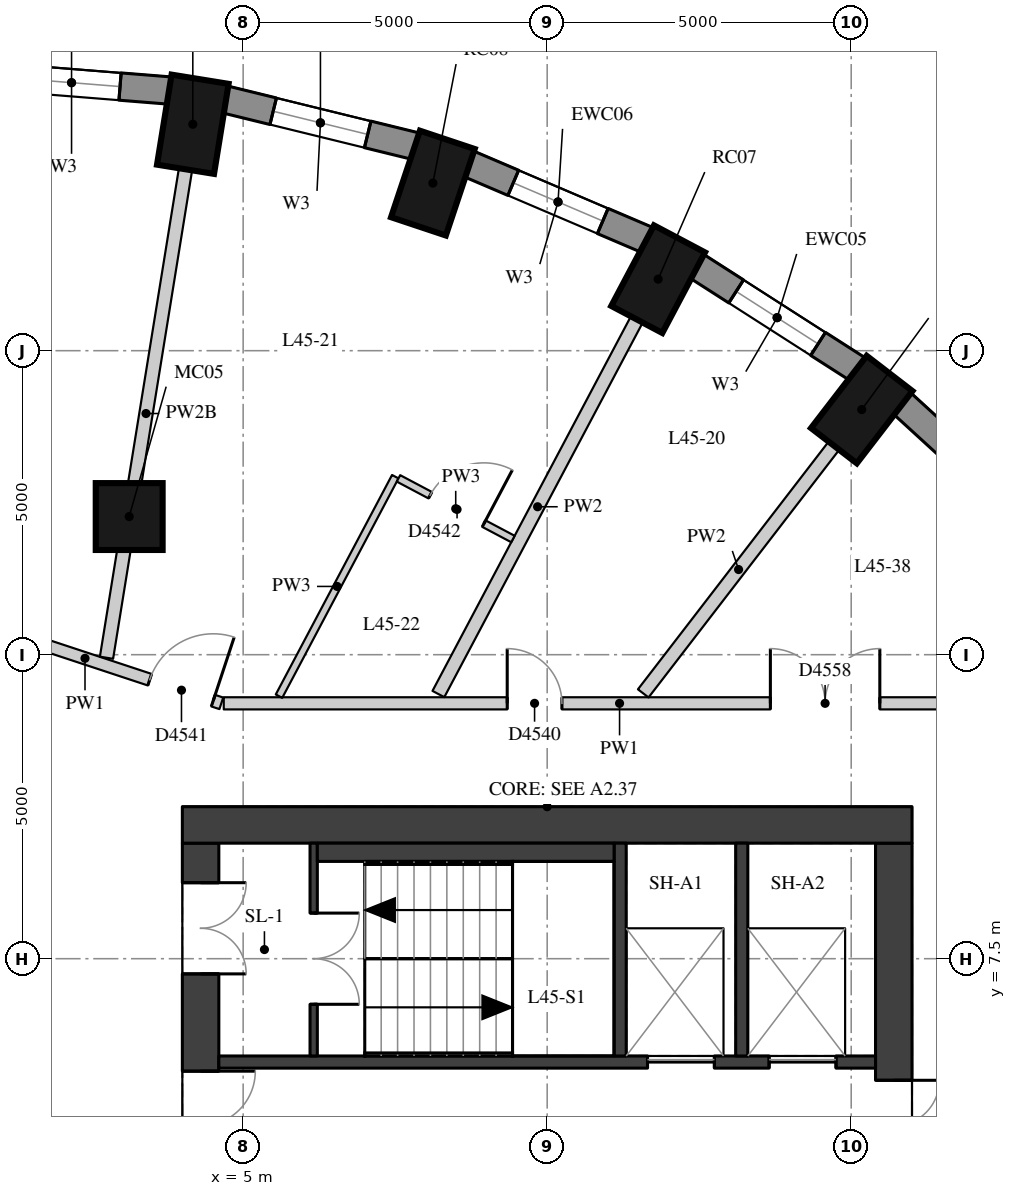
"""IFC4 building model, lengths in metres.
Left out: names, types, materials, properties, quantities, classifications, styles, units other than length and angle.
Written with IfcOpenShell. Run it as: python <this file> out.ifc"""

import sys

from ifc_helpers import new_model, si_unit, direction, frame, frame_2d, origin, origin_2d, place, context, subcontext, project, spatial, rectangle, extrude, element, fill, save


model = new_model("IFC4")
c1 = context("Model", 3, precision=1e-05, world=origin(), true_north=direction((0.0, 1.0)))
c2 = subcontext(c1, "Body", "Model", "MODEL_VIEW")
j1 = project(units=[si_unit("LENGTHUNIT", "METRE"), si_unit("PLANEANGLEUNIT", "RADIAN")], contexts=[c1])
p1 = place(None, origin())
s1 = spatial("IfcSite", under=j1, at=p1, CompositionType="ELEMENT")
p2 = place(p1, origin())
s2 = spatial("IfcBuilding", under=s1, at=p2, CompositionType="ELEMENT")
p3 = place(p2, frame((0.0, 0.0, 161.6)))
s3 = spatial("IfcBuildingStorey", under=s2, at=p3, CompositionType="ELEMENT", Elevation=161.6)
for number, where, z_axis, x_axis in (
    (1, (15.173, 16.532, 0.0), (0.0, 0.0, 1.0), (0.61, 0.792, 0.0)),
    (2, (11.825, 18.676, 0.0), (0.0, 0.0, 1.0), (0.468, 0.884, 0.0)),
    (3, (8.12, 20.256, 0.0), (0.0, 0.0, 1.0), (0.317, 0.949, 0.0)),
    (4, (4.172, 21.224, 0.0), (0.0, 0.0, 1.0), (0.16, 0.987, 0.0)),
):
    element("IfcColumn", number, at=place(p3, frame(where, z_axis=z_axis, x_axis=x_axis)), inside=s3, PredefinedType="COLUMN", context=c2, shape_type="SweptSolid", body=[
        extrude(rectangle(XDim=1.5, YDim=0.95, at=origin_2d()), origin(), (0.0, 0.0, 1.0), 3.3),
    ])
p4 = place(p3, frame((3.126, 14.772, 0.0), z_axis=(0.0, 0.0, 1.0), x_axis=(1.0, 0.0, 0.0)))
e5 = element("IfcColumn", 5, at=p4, inside=s3, PredefinedType="COLUMN", context=c2, shape_type="SweptSolid", body=[
    extrude(rectangle(XDim=1.1, YDim=1.1, at=origin_2d()), origin(), (0.0, 0.0, 1.0), 3.3),
])
p5 = place(p3, frame((18.113, 14.55, 0.0), z_axis=(0.0, 0.0, 1.0), x_axis=(-0.737808755941, 0.675009807082, 0.0)))
e6 = element("IfcWall", 6, at=p5, inside=s3, PredefinedType="SOLIDWALL", context=c2, shape_type="SweptSolid", body=[
    extrude(rectangle(XDim=3.094, YDim=0.45, at=frame_2d((1.547, 0.0))), origin(), (0.0, 0.0, 1.0), 3.02),
])
p6 = place(p3, frame((15.108, 17.193, 0.0), z_axis=(0.0, 0.0, 1.0), x_axis=(-0.842030726237, 0.539429565442, 0.0)))
e7 = element("IfcWall", 7, at=p6, inside=s3, PredefinedType="SOLIDWALL", context=c2, shape_type="SweptSolid", body=[
    extrude(rectangle(XDim=3.151, YDim=0.45, at=frame_2d((1.576, 0.0))), origin(), (0.0, 0.0, 1.0), 3.02),
])
p7 = place(p6, frame((0.776, 0.0, 0.4)))
e8 = element("IfcOpeningElement", 8, at=p7, cuts=e7, PredefinedType="OPENING", context=c2, shape_type="SweptSolid", body=[
    extrude(rectangle(XDim=1.6, YDim=1.75, at=frame_2d((0.8, 0.875))), frame((0.0, 0.235, 0.0), z_axis=(0.0, -1.0, 0.0), x_axis=(1.0, 0.0, 0.0)), (0.0, 0.0, 1.0), 0.47),
])
p8 = place(p3, frame((11.65, 19.319, 0.0), z_axis=(0.0, 0.0, 1.0), x_axis=(-0.91981046949, 0.392362969986, 0.0)))
e9 = element("IfcWall", 9, at=p8, inside=s3, PredefinedType="SOLIDWALL", context=c2, shape_type="SweptSolid", body=[
    extrude(rectangle(XDim=3.201, YDim=0.45, at=frame_2d((1.6, 0.0))), origin(), (0.0, 0.0, 1.0), 3.02),
])
p9 = place(p8, frame((0.8, 0.0, 0.4)))
e10 = element("IfcOpeningElement", 10, at=p9, cuts=e9, PredefinedType="OPENING", context=c2, shape_type="SweptSolid", body=[
    extrude(rectangle(XDim=1.6, YDim=1.75, at=frame_2d((0.8, 0.875))), frame((0.0, 0.235, 0.0), z_axis=(0.0, -1.0, 0.0), x_axis=(1.0, 0.0, 0.0)), (0.0, 0.0, 1.0), 0.47),
])
p10 = place(p3, frame((7.843, 20.862, 0.0), z_axis=(0.0, 0.0, 1.0), x_axis=(-0.971237178372, 0.238114139328, 0.0)))
e11 = element("IfcWall", 11, at=p10, inside=s3, PredefinedType="SOLIDWALL", context=c2, shape_type="SweptSolid", body=[
    extrude(rectangle(XDim=3.237, YDim=0.45, at=frame_2d((1.618, 0.0))), origin(), (0.0, 0.0, 1.0), 3.02),
])
p11 = place(p10, frame((0.818, 0.0, 0.4)))
e12 = element("IfcOpeningElement", 12, at=p11, cuts=e11, PredefinedType="OPENING", context=c2, shape_type="SweptSolid", body=[
    extrude(rectangle(XDim=1.6, YDim=1.75, at=frame_2d((0.8, 0.875))), frame((0.0, 0.235, 0.0), z_axis=(0.0, -1.0, 0.0), x_axis=(1.0, 0.0, 0.0)), (0.0, 0.0, 1.0), 0.47),
])
p12 = place(p3, frame((3.801, 21.778, 0.0), z_axis=(0.0, 0.0, 1.0), x_axis=(-0.996812416891, 0.079780984773, 0.0)))
e13 = element("IfcWall", 13, at=p12, inside=s3, PredefinedType="SOLIDWALL", context=c2, shape_type="SweptSolid", body=[
    extrude(rectangle(XDim=3.256, YDim=0.45, at=frame_2d((1.628, 0.0))), origin(), (0.0, 0.0, 1.0), 3.02),
])
p13 = place(p12, frame((0.828, 0.0, 0.4)))
e14 = element("IfcOpeningElement", 14, at=p13, cuts=e13, PredefinedType="OPENING", context=c2, shape_type="SweptSolid", body=[
    extrude(rectangle(XDim=1.6, YDim=1.75, at=frame_2d((0.8, 0.875))), frame((0.0, 0.235, 0.0), z_axis=(0.0, -1.0, 0.0), x_axis=(1.0, 0.0, 0.0)), (0.0, 0.0, 1.0), 0.47),
])
p14 = place(p3, frame((4.3, -9.4, 0.0), z_axis=(0.0, 0.0, 1.0), x_axis=(0.0, 1.0, 0.0)))
e15 = element("IfcWall", 15, at=p14, inside=s3, PredefinedType="SHEAR", context=c2, shape_type="SweptSolid", body=[
    extrude(rectangle(XDim=18.8, YDim=0.6, at=frame_2d((9.4, 0.0))), origin(), (0.0, 0.0, 1.0), 3.02),
])
p15 = place(p14, frame((0.65, 0.0, 0.0)))
e16 = element("IfcOpeningElement", 16, at=p15, cuts=e15, PredefinedType="OPENING", context=c2, shape_type="SweptSolid", body=[
    extrude(rectangle(XDim=1.5, YDim=2.1, at=frame_2d((0.75, 1.05))), frame((0.0, 0.31, 0.0), z_axis=(0.0, -1.0, 0.0), x_axis=(1.0, 0.0, 0.0)), (0.0, 0.0, 1.0), 0.62),
])
p16 = place(p14, frame((3.75, 0.0, 0.0)))
e17 = element("IfcOpeningElement", 17, at=p16, cuts=e15, PredefinedType="OPENING", context=c2, shape_type="SweptSolid", body=[
    extrude(rectangle(XDim=1.8, YDim=2.1, at=frame_2d((0.9, 1.05))), frame((0.0, 0.31, 0.0), z_axis=(0.0, -1.0, 0.0), x_axis=(1.0, 0.0, 0.0)), (0.0, 0.0, 1.0), 0.62),
])
p17 = place(p14, frame((6.25, 0.0, 0.0)))
e18 = element("IfcOpeningElement", 18, at=p17, cuts=e15, PredefinedType="OPENING", context=c2, shape_type="SweptSolid", body=[
    extrude(rectangle(XDim=1.1, YDim=2.1, at=frame_2d((0.55, 1.05))), frame((0.0, 0.31, 0.0), z_axis=(0.0, -1.0, 0.0), x_axis=(1.0, 0.0, 0.0)), (0.0, 0.0, 1.0), 0.62),
])
p18 = place(p14, frame((8.9, 0.0, 0.0)))
e19 = element("IfcOpeningElement", 19, at=p18, cuts=e15, PredefinedType="OPENING", context=c2, shape_type="SweptSolid", body=[
    extrude(rectangle(XDim=1.0, YDim=2.1, at=frame_2d((0.5, 1.05))), frame((0.0, 0.31, 0.0), z_axis=(0.0, -1.0, 0.0), x_axis=(1.0, 0.0, 0.0)), (0.0, 0.0, 1.0), 0.62),
])
p19 = place(p14, frame((11.45, 0.0, 0.0)))
e20 = element("IfcOpeningElement", 20, at=p19, cuts=e15, PredefinedType="OPENING", context=c2, shape_type="SweptSolid", body=[
    extrude(rectangle(XDim=1.1, YDim=2.1, at=frame_2d((0.55, 1.05))), frame((0.0, 0.31, 0.0), z_axis=(0.0, -1.0, 0.0), x_axis=(1.0, 0.0, 0.0)), (0.0, 0.0, 1.0), 0.62),
])
p20 = place(p14, frame((13.25, 0.0, 0.0)))
e21 = element("IfcOpeningElement", 21, at=p20, cuts=e15, PredefinedType="OPENING", context=c2, shape_type="SweptSolid", body=[
    extrude(rectangle(XDim=1.8, YDim=2.1, at=frame_2d((0.9, 1.05))), frame((0.0, 0.31, 0.0), z_axis=(0.0, -1.0, 0.0), x_axis=(1.0, 0.0, 0.0)), (0.0, 0.0, 1.0), 0.62),
])
p21 = place(p14, frame((16.65, 0.0, 0.0)))
e22 = element("IfcOpeningElement", 22, at=p21, cuts=e15, PredefinedType="OPENING", context=c2, shape_type="SweptSolid", body=[
    extrude(rectangle(XDim=1.5, YDim=2.1, at=frame_2d((0.75, 1.05))), frame((0.0, 0.31, 0.0), z_axis=(0.0, -1.0, 0.0), x_axis=(1.0, 0.0, 0.0)), (0.0, 0.0, 1.0), 0.62),
])
p22 = place(p3, frame((15.7, -9.4, 0.0), z_axis=(0.0, 0.0, 1.0), x_axis=(0.0, 1.0, 0.0)))
e23 = element("IfcWall", 23, at=p22, inside=s3, PredefinedType="SHEAR", context=c2, shape_type="SweptSolid", body=[
    extrude(rectangle(XDim=18.8, YDim=0.6, at=frame_2d((9.4, 0.0))), origin(), (0.0, 0.0, 1.0), 3.02),
])
p23 = place(p22, frame((13.4, 0.0, 0.0)))
e24 = element("IfcOpeningElement", 24, at=p23, cuts=e23, PredefinedType="OPENING", context=c2, shape_type="SweptSolid", body=[
    extrude(rectangle(XDim=1.5, YDim=2.1, at=frame_2d((0.75, 1.05))), frame((0.0, 0.31, 0.0), z_axis=(0.0, -1.0, 0.0), x_axis=(1.0, 0.0, 0.0)), (0.0, 0.0, 1.0), 0.62),
])
p24 = place(p22, frame((3.9, 0.0, 0.0)))
e25 = element("IfcOpeningElement", 25, at=p24, cuts=e23, PredefinedType="OPENING", context=c2, shape_type="SweptSolid", body=[
    extrude(rectangle(XDim=1.5, YDim=2.1, at=frame_2d((0.75, 1.05))), frame((0.0, 0.31, 0.0), z_axis=(0.0, -1.0, 0.0), x_axis=(1.0, 0.0, 0.0)), (0.0, 0.0, 1.0), 0.62),
])
p25 = place(p3, frame((4.0, 9.7, 0.0), z_axis=(0.0, 0.0, 1.0), x_axis=(1.0, 0.0, 0.0)))
e26 = element("IfcWall", 26, at=p25, inside=s3, PredefinedType="SHEAR", context=c2, shape_type="SweptSolid", body=[
    extrude(rectangle(XDim=12.0, YDim=0.6, at=frame_2d((6.0, 0.0))), origin(), (0.0, 0.0, 1.0), 3.02),
])
p26 = place(p3, frame((4.6, 5.8, 0.0), z_axis=(0.0, 0.0, 1.0), x_axis=(1.0, 0.0, 0.0)))
e27 = element("IfcWall", 27, at=p26, inside=s3, PredefinedType="SHEAR", context=c2, shape_type="SweptSolid", body=[
    extrude(rectangle(XDim=10.8, YDim=0.2, at=frame_2d((5.4, 0.0))), origin(), (0.0, 0.0, 1.0), 3.02),
])
p27 = place(p26, frame((7.05, 0.0, 0.0)))
e28 = element("IfcOpeningElement", 28, at=p27, cuts=e27, PredefinedType="OPENING", context=c2, shape_type="SweptSolid", body=[
    extrude(rectangle(XDim=1.1, YDim=2.1, at=frame_2d((0.55, 1.05))), frame((0.0, 0.11, 0.0), z_axis=(0.0, -1.0, 0.0), x_axis=(1.0, 0.0, 0.0)), (0.0, 0.0, 1.0), 0.22),
])
p28 = place(p26, frame((9.05, 0.0, 0.0)))
e29 = element("IfcOpeningElement", 29, at=p28, cuts=e27, PredefinedType="OPENING", context=c2, shape_type="SweptSolid", body=[
    extrude(rectangle(XDim=1.1, YDim=2.1, at=frame_2d((0.55, 1.05))), frame((0.0, 0.11, 0.0), z_axis=(0.0, -1.0, 0.0), x_axis=(1.0, 0.0, 0.0)), (0.0, 0.0, 1.0), 0.22),
])
for number, where, z_axis, x_axis in (
    (30, (11.2, 5.9, 0.0), (0.0, 0.0, 1.0), (0.0, 1.0, 0.0)),
    (31, (13.2, 5.9, 0.0), (0.0, 0.0, 1.0), (0.0, 1.0, 0.0)),
):
    element("IfcWall", number, at=place(p3, frame(where, z_axis=z_axis, x_axis=x_axis)), inside=s3, PredefinedType="SHEAR", context=c2, shape_type="SweptSolid", body=[
        extrude(rectangle(XDim=3.5, YDim=0.2, at=frame_2d((1.75, 0.0))), origin(), (0.0, 0.0, 1.0), 3.02),
    ])
p29 = place(p3, frame((6.16, 5.9, 0.0), z_axis=(0.0, 0.0, 1.0), x_axis=(0.0, 1.0, 0.0)))
e32 = element("IfcWall", 32, at=p29, inside=s3, PredefinedType="SHEAR", context=c2, shape_type="SweptSolid", body=[
    extrude(rectangle(XDim=3.5, YDim=0.12, at=frame_2d((1.75, 0.0))), origin(), (0.0, 0.0, 1.0), 3.02),
])
p30 = place(p29, frame((0.85, 0.0, 0.0)))
e33 = element("IfcOpeningElement", 33, at=p30, cuts=e32, PredefinedType="OPENING", context=c2, shape_type="SweptSolid", body=[
    extrude(rectangle(XDim=1.5, YDim=2.1, at=frame_2d((0.75, 1.05))), frame((0.0, 0.07, 0.0), z_axis=(0.0, -1.0, 0.0), x_axis=(1.0, 0.0, 0.0)), (0.0, 0.0, 1.0), 0.14),
])
p31 = place(p3, frame((6.22, 9.25, 0.0), z_axis=(0.0, 0.0, 1.0), x_axis=(1.0, 0.0, 0.0)))
e34 = element("IfcWall", 34, at=p31, inside=s3, PredefinedType="PARTITIONING", context=c2, shape_type="SweptSolid", body=[
    extrude(rectangle(XDim=4.88, YDim=0.3, at=frame_2d((2.44, 0.0))), origin(), (0.0, 0.0, 1.0), 3.02),
])
p32 = place(p3, frame((0.157, 13.181, 0.0), z_axis=(0.0, 0.0, 1.0), x_axis=(0.949543217684, -0.313636218811, 0.0)))
e35 = element("IfcWall", 35, at=p32, inside=s3, PredefinedType="PARTITIONING", context=c2, shape_type="SweptSolid", body=[
    extrude(rectangle(XDim=4.722, YDim=0.2, at=frame_2d((2.361, 0.0))), origin(), (0.0, 0.0, 1.0), 3.02),
])
p33 = place(p32, frame((3.482, 0.0, 0.0)))
e36 = element("IfcOpeningElement", 36, at=p33, cuts=e35, PredefinedType="OPENING", context=c2, shape_type="SweptSolid", body=[
    extrude(rectangle(XDim=1.1, YDim=2.1, at=frame_2d((0.55, 1.05))), frame((0.0, 0.11, 0.0), z_axis=(0.0, -1.0, 0.0), x_axis=(1.0, 0.0, 0.0)), (0.0, 0.0, 1.0), 0.22),
])
p34 = place(p3, frame((4.681, 11.7, 0.0), z_axis=(0.0, 0.0, 1.0), x_axis=(1.0, 0.0, 0.0)))
e37 = element("IfcWall", 37, at=p34, inside=s3, PredefinedType="PARTITIONING", context=c2, shape_type="SweptSolid", body=[
    extrude(rectangle(XDim=13.019, YDim=0.2, at=frame_2d((6.51, 0.0))), origin(), (0.0, 0.0, 1.0), 3.02),
])
p35 = place(p34, frame((4.662, 0.0, 0.0)))
e38 = element("IfcOpeningElement", 38, at=p35, cuts=e37, PredefinedType="OPENING", context=c2, shape_type="SweptSolid", body=[
    extrude(rectangle(XDim=0.9, YDim=2.1, at=frame_2d((0.45, 1.05))), frame((0.0, 0.11, 0.0), z_axis=(0.0, -1.0, 0.0), x_axis=(1.0, 0.0, 0.0)), (0.0, 0.0, 1.0), 0.22),
])
p36 = place(p34, frame((8.99, 0.0, 0.0)))
e39 = element("IfcOpeningElement", 39, at=p36, cuts=e37, PredefinedType="OPENING", context=c2, shape_type="SweptSolid", body=[
    extrude(rectangle(XDim=1.8, YDim=2.1, at=frame_2d((0.9, 1.05))), frame((0.0, 0.11, 0.0), z_axis=(0.0, -1.0, 0.0), x_axis=(1.0, 0.0, 0.0)), (0.0, 0.0, 1.0), 0.22),
])
p37 = place(p3, frame((14.716, 15.937, 0.0), z_axis=(0.0, 0.0, 1.0), x_axis=(-0.609997597499, -0.792403262894, 0.0)))
e40 = element("IfcWall", 40, at=p37, inside=s3, PredefinedType="PARTITIONING", context=c2, shape_type="SweptSolid", body=[
    extrude(rectangle(XDim=5.141, YDim=0.22, at=frame_2d((2.57, 0.0))), origin(), (0.0, 0.0, 1.0), 3.02),
])
p38 = place(p3, frame((11.474, 18.013, 0.0), z_axis=(0.0, 0.0, 1.0), x_axis=(-0.468047008097, -0.883703569197, 0.0)))
e41 = element("IfcWall", 41, at=p38, inside=s3, PredefinedType="PARTITIONING", context=c2, shape_type="SweptSolid", body=[
    extrude(rectangle(XDim=6.971, YDim=0.22, at=frame_2d((3.486, 0.0))), origin(), (0.0, 0.0, 1.0), 3.02),
])
p39 = place(p3, frame((4.052, 20.484, 0.0), z_axis=(0.0, 0.0, 1.0), x_axis=(-0.159683255106, -0.987168302793, 0.0)))
e42 = element("IfcWall", 42, at=p39, inside=s3, PredefinedType="PARTITIONING", context=c2, shape_type="SweptSolid", body=[
    extrude(rectangle(XDim=8.138, YDim=0.22, at=frame_2d((4.069, 0.0))), origin(), (0.0, 0.0, 1.0), 2.57),
])
p40 = place(p3, frame((5.59, 11.818, 0.0), z_axis=(0.0, 0.0, 1.0), x_axis=(0.468055206857, 0.883699226736, 0.0)))
e43 = element("IfcWall", 43, at=p40, inside=s3, PredefinedType="PARTITIONING", context=c2, shape_type="SweptSolid", body=[
    extrude(rectangle(XDim=4.085, YDim=0.12, at=frame_2d((2.042, 0.0))), origin(), (0.0, 0.0, 1.0), 3.02),
])
p41 = place(p3, frame((7.555, 15.4, 0.0), z_axis=(0.0, 0.0, 1.0), x_axis=(0.883681952223, -0.468087820088, 0.0)))
e44 = element("IfcWall", 44, at=p41, inside=s3, PredefinedType="PARTITIONING", context=c2, shape_type="SweptSolid", body=[
    extrude(rectangle(XDim=2.13, YDim=0.12, at=frame_2d((1.065, 0.0))), origin(), (0.0, 0.0, 1.0), 3.02),
])
p42 = place(p41, frame((0.59, 0.0, 0.0)))
e45 = element("IfcOpeningElement", 45, at=p42, cuts=e44, PredefinedType="OPENING", context=c2, shape_type="SweptSolid", body=[
    extrude(rectangle(XDim=1.0, YDim=2.1, at=frame_2d((0.5, 1.05))), frame((0.0, 0.07, 0.0), z_axis=(0.0, -1.0, 0.0), x_axis=(1.0, 0.0, 0.0)), (0.0, 0.0, 1.0), 0.14),
])
p43 = place(p7, origin())
e46 = element("IfcWindow", 46, at=p43, inside=s3, PartitioningType="SINGLE_PANEL", PredefinedType="WINDOW", context=c2, shape_type="SweptSolid", body=[
    extrude(rectangle(XDim=1.6, YDim=1.75, at=frame_2d((0.8, 0.875))), frame((0.0, 0.035, 0.0), z_axis=(0.0, -1.0, 0.0), x_axis=(1.0, 0.0, 0.0)), (0.0, 0.0, 1.0), 0.06),
])
fill(e8, e46)
p44 = place(p9, origin())
e47 = element("IfcWindow", 47, at=p44, inside=s3, PartitioningType="SINGLE_PANEL", PredefinedType="WINDOW", context=c2, shape_type="SweptSolid", body=[
    extrude(rectangle(XDim=1.6, YDim=1.75, at=frame_2d((0.8, 0.875))), frame((0.0, 0.035, 0.0), z_axis=(0.0, -1.0, 0.0), x_axis=(1.0, 0.0, 0.0)), (0.0, 0.0, 1.0), 0.06),
])
fill(e10, e47)
p45 = place(p11, origin())
e48 = element("IfcWindow", 48, at=p45, inside=s3, PartitioningType="SINGLE_PANEL", PredefinedType="WINDOW", context=c2, shape_type="SweptSolid", body=[
    extrude(rectangle(XDim=1.6, YDim=1.75, at=frame_2d((0.8, 0.875))), frame((0.0, 0.035, 0.0), z_axis=(0.0, -1.0, 0.0), x_axis=(1.0, 0.0, 0.0)), (0.0, 0.0, 1.0), 0.06),
])
fill(e12, e48)
p46 = place(p13, origin())
e49 = element("IfcWindow", 49, at=p46, inside=s3, PartitioningType="SINGLE_PANEL", PredefinedType="WINDOW", context=c2, shape_type="SweptSolid", body=[
    extrude(rectangle(XDim=1.6, YDim=1.75, at=frame_2d((0.8, 0.875))), frame((0.0, 0.035, 0.0), z_axis=(0.0, -1.0, 0.0), x_axis=(1.0, 0.0, 0.0)), (0.0, 0.0, 1.0), 0.06),
])
fill(e14, e49)
p47 = place(p20, origin())
e50 = element("IfcDoor", 50, at=p47, inside=s3, OperationType="DOUBLE_DOOR_SINGLE_SWING", PredefinedType="DOOR", context=c2, shape_type="SweptSolid", body=[
    extrude(rectangle(XDim=1.8, YDim=2.1, at=frame_2d((0.9, 1.05))), frame((0.0, 0.025, 0.0), z_axis=(0.0, -1.0, 0.0), x_axis=(1.0, 0.0, 0.0)), (0.0, 0.0, 1.0), 0.05),
])
fill(e21, e50)
p48 = place(p21, origin())
e51 = element("IfcDoor", 51, at=p48, inside=s3, OperationType="DOUBLE_DOOR_SINGLE_SWING", PredefinedType="DOOR", context=c2, shape_type="SweptSolid", body=[
    extrude(rectangle(XDim=1.5, YDim=2.1, at=frame_2d((0.75, 1.05))), frame((0.0, 0.025, 0.0), z_axis=(0.0, -1.0, 0.0), x_axis=(1.0, 0.0, 0.0)), (0.0, 0.0, 1.0), 0.05),
])
fill(e22, e51)
p49 = place(p23, origin())
e52 = element("IfcDoor", 52, at=p49, inside=s3, OperationType="DOUBLE_DOOR_SINGLE_SWING", PredefinedType="DOOR", context=c2, shape_type="SweptSolid", body=[
    extrude(rectangle(XDim=1.5, YDim=2.1, at=frame_2d((0.75, 1.05))), frame((0.0, 0.025, 0.0), z_axis=(0.0, -1.0, 0.0), x_axis=(1.0, 0.0, 0.0)), (0.0, 0.0, 1.0), 0.05),
])
fill(e24, e52)
p50 = place(p30, origin())
e53 = element("IfcDoor", 53, at=p50, inside=s3, OperationType="DOUBLE_DOOR_SINGLE_SWING", PredefinedType="DOOR", context=c2, shape_type="SweptSolid", body=[
    extrude(rectangle(XDim=1.5, YDim=2.1, at=frame_2d((0.75, 1.05))), frame((0.0, 0.025, 0.0), z_axis=(0.0, -1.0, 0.0), x_axis=(1.0, 0.0, 0.0)), (0.0, 0.0, 1.0), 0.05),
])
fill(e33, e53)
p51 = place(p27, origin())
e54 = element("IfcDoor", 54, at=p51, inside=s3, OperationType="DOUBLE_DOOR_SLIDING", PredefinedType="DOOR", context=c2, shape_type="SweptSolid", body=[
    extrude(rectangle(XDim=1.1, YDim=2.1, at=frame_2d((0.55, 1.05))), frame((0.0, 0.025, 0.0), z_axis=(0.0, -1.0, 0.0), x_axis=(1.0, 0.0, 0.0)), (0.0, 0.0, 1.0), 0.05),
])
fill(e28, e54)
p52 = place(p28, origin())
e55 = element("IfcDoor", 55, at=p52, inside=s3, OperationType="DOUBLE_DOOR_SLIDING", PredefinedType="DOOR", context=c2, shape_type="SweptSolid", body=[
    extrude(rectangle(XDim=1.1, YDim=2.1, at=frame_2d((0.55, 1.05))), frame((0.0, 0.025, 0.0), z_axis=(0.0, -1.0, 0.0), x_axis=(1.0, 0.0, 0.0)), (0.0, 0.0, 1.0), 0.05),
])
fill(e29, e55)
p53 = place(p35, origin())
e56 = element("IfcDoor", 56, at=p53, inside=s3, OperationType="SINGLE_SWING_LEFT", PredefinedType="DOOR", context=c2, shape_type="SweptSolid", body=[
    extrude(rectangle(XDim=0.9, YDim=2.1, at=frame_2d((0.45, 1.05))), frame((0.0, 0.025, 0.0), z_axis=(0.0, -1.0, 0.0), x_axis=(1.0, 0.0, 0.0)), (0.0, 0.0, 1.0), 0.05),
])
fill(e38, e56)
p54 = place(p33, origin())
e57 = element("IfcDoor", 57, at=p54, inside=s3, OperationType="SINGLE_SWING_RIGHT", PredefinedType="DOOR", context=c2, shape_type="SweptSolid", body=[
    extrude(rectangle(XDim=1.1, YDim=2.1, at=frame_2d((0.55, 1.05))), frame((0.0, 0.025, 0.0), z_axis=(0.0, -1.0, 0.0), x_axis=(1.0, 0.0, 0.0)), (0.0, 0.0, 1.0), 0.05),
])
fill(e36, e57)
p55 = place(p42, origin())
e58 = element("IfcDoor", 58, at=p55, inside=s3, OperationType="SINGLE_SWING_RIGHT", PredefinedType="DOOR", context=c2, shape_type="SweptSolid", body=[
    extrude(rectangle(XDim=1.0, YDim=2.1, at=frame_2d((0.5, 1.05))), frame((0.0, 0.025, 0.0), z_axis=(0.0, -1.0, 0.0), x_axis=(1.0, 0.0, 0.0)), (0.0, 0.0, 1.0), 0.05),
])
fill(e45, e58)
p56 = place(p36, origin())
e59 = element("IfcDoor", 59, at=p56, inside=s3, OperationType="DOUBLE_DOOR_SINGLE_SWING", PredefinedType="DOOR", context=c2, shape_type="SweptSolid", body=[
    extrude(rectangle(XDim=1.8, YDim=2.1, at=frame_2d((0.9, 1.05))), frame((0.0, 0.025, 0.0), z_axis=(0.0, -1.0, 0.0), x_axis=(1.0, 0.0, 0.0)), (0.0, 0.0, 1.0), 0.05),
])
fill(e39, e59)
save(model, sys.argv[1])
